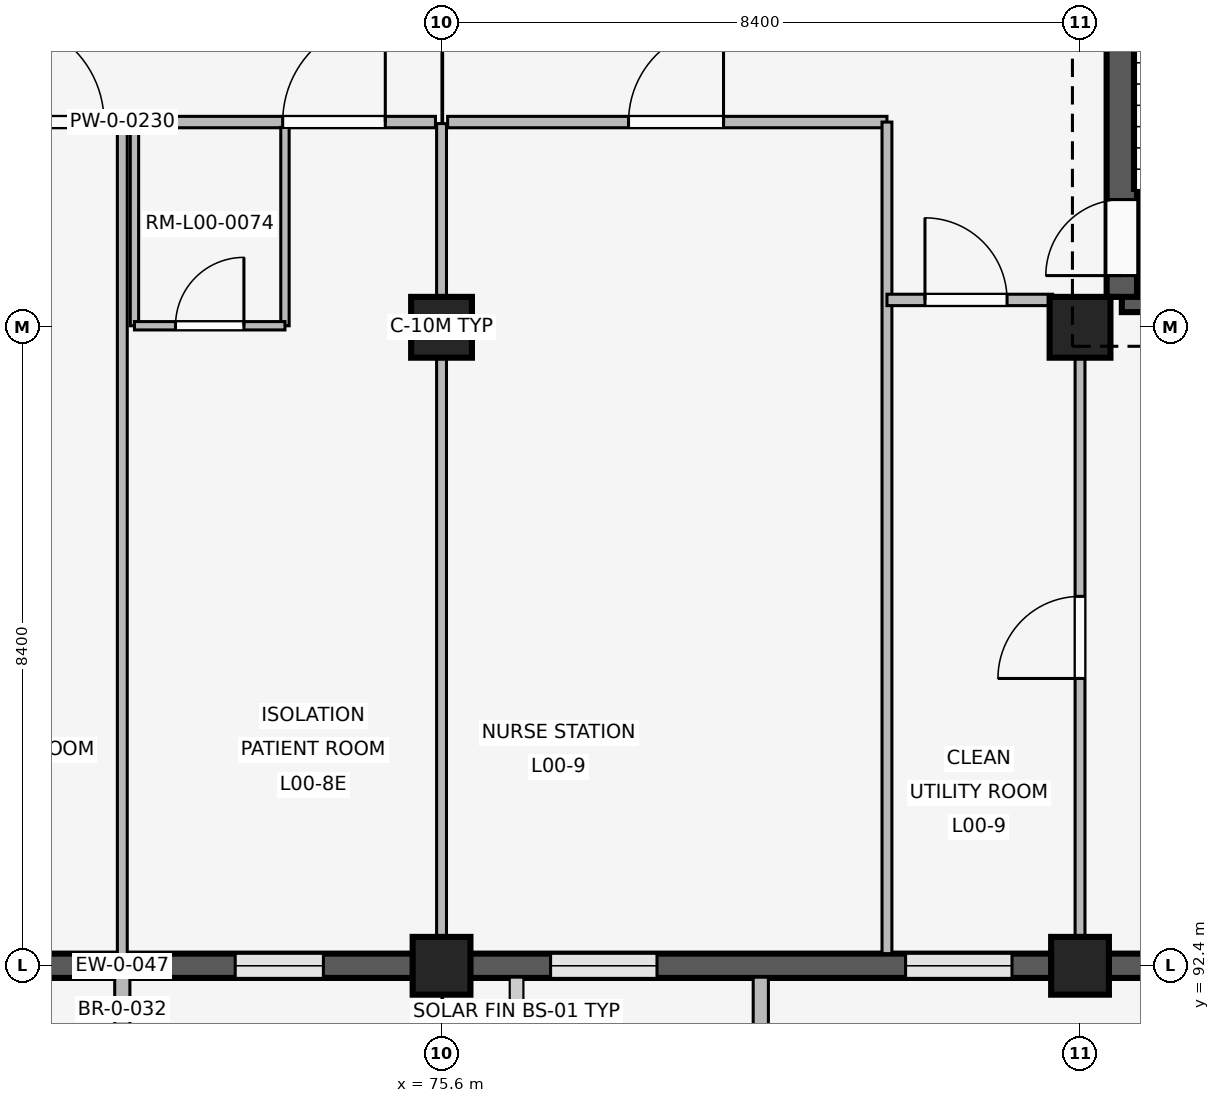
"""IFC4 building model, lengths in metres.
Left out: names, types, materials, properties, quantities, classifications, styles, units other than length and angle.
Written with IfcOpenShell. Run it as: python <this file> out.ifc"""

import sys

from ifc_helpers import new_model, si_unit, direction, frame, frame_2d, origin, origin_2d, place, context, subcontext, project, spatial, rectangle, extrude, element, fill, save


model = new_model("IFC4")
c1 = context("Model", 3, precision=1e-05, world=origin(), true_north=direction((0.0, 1.0)))
c2 = subcontext(c1, "Body", "Model", "MODEL_VIEW")
j1 = project(units=[si_unit("LENGTHUNIT", "METRE"), si_unit("PLANEANGLEUNIT", "RADIAN")], contexts=[c1])
p1 = place(None, origin())
s1 = spatial("IfcSite", under=j1, at=p1, CompositionType="ELEMENT")
p2 = place(p1, origin())
s2 = spatial("IfcBuilding", under=s1, at=p2, CompositionType="ELEMENT")
p3 = place(p2, origin())
s3 = spatial("IfcBuildingStorey", under=s2, at=p3, CompositionType="ELEMENT", Elevation=0.0)
p4 = place(p3, frame((75.6, 92.4, 0.0), z_axis=(0.0, 0.0, 1.0), x_axis=(1.0, 0.0, 0.0)))
e1 = element("IfcColumn", 1, at=p4, inside=s3, PredefinedType="COLUMN", context=c2, shape_type="SweptSolid", body=[
    extrude(rectangle(XDim=0.76, YDim=0.76, at=origin_2d()), origin(), (0.0, 0.0, 1.0), 4.8),
])
p5 = place(p3, frame((75.6, 100.8, 0.0), z_axis=(0.0, 0.0, 1.0), x_axis=(1.0, 0.0, 0.0)))
e2 = element("IfcColumn", 2, at=p5, inside=s3, PredefinedType="COLUMN", context=c2, shape_type="SweptSolid", body=[
    extrude(rectangle(XDim=0.8, YDim=0.8, at=origin_2d()), origin(), (0.0, 0.0, 1.0), 4.8),
])
p6 = place(p3, frame((84.0, 92.4, 0.0), z_axis=(0.0, 0.0, 1.0), x_axis=(1.0, 0.0, 0.0)))
e3 = element("IfcColumn", 3, at=p6, inside=s3, PredefinedType="COLUMN", context=c2, shape_type="SweptSolid", body=[
    extrude(rectangle(XDim=0.76, YDim=0.76, at=origin_2d()), origin(), (0.0, 0.0, 1.0), 4.8),
])
p7 = place(p3, frame((84.0, 100.8, 0.0), z_axis=(0.0, 0.0, 1.0), x_axis=(1.0, 0.0, 0.0)))
e4 = element("IfcColumn", 4, at=p7, inside=s3, PredefinedType="COLUMN", context=c2, shape_type="SweptSolid", body=[
    extrude(rectangle(XDim=0.8, YDim=0.8, at=origin_2d()), origin(), (0.0, 0.0, 1.0), 4.8),
])
p8 = place(p3, frame((75.225, 92.4, 0.0), z_axis=(0.0, 0.0, 1.0), x_axis=(-1.0, 0.0, 0.0)))
e5 = element("IfcWall", 5, at=p8, inside=s3, PredefinedType="SOLIDWALL", context=c2, shape_type="SweptSolid", body=[
    extrude(rectangle(XDim=7.65, YDim=0.32, at=frame_2d((3.825, 0.0))), origin(), (0.0, 0.0, 1.0), 3.82),
])
p9 = place(p8, frame((1.179, 0.0, 0.85)))
e6 = element("IfcOpeningElement", 6, at=p9, cuts=e5, PredefinedType="OPENING", context=c2, shape_type="SweptSolid", body=[
    extrude(rectangle(XDim=1.16, YDim=1.48, at=frame_2d((0.58, 0.74))), frame((0.0, 0.17, 0.0), z_axis=(0.0, -1.0, 0.0), x_axis=(1.0, 0.0, 0.0)), (0.0, 0.0, 1.0), 0.34),
])
p10 = place(p8, frame((5.311, 0.0, 0.85)))
e7 = element("IfcOpeningElement", 7, at=p10, cuts=e5, PredefinedType="OPENING", context=c2, shape_type="SweptSolid", body=[
    extrude(rectangle(XDim=1.16, YDim=1.48, at=frame_2d((0.58, 0.74))), frame((0.0, 0.17, 0.0), z_axis=(0.0, -1.0, 0.0), x_axis=(1.0, 0.0, 0.0)), (0.0, 0.0, 1.0), 0.34),
])
p11 = place(p3, frame((71.4, 92.25, 0.0), z_axis=(0.0, 0.0, 1.0), x_axis=(0.0, -1.0, 0.0)))
e8 = element("IfcWall", 8, at=p11, inside=s3, PredefinedType="ELEMENTEDWALL", context=c2, shape_type="SweptSolid", body=[
    extrude(rectangle(XDim=0.85, YDim=0.2, at=frame_2d((0.425, 0.0))), origin(), (0.0, 0.0, 1.0), 3.8),
])
p12 = place(p3, frame((83.625, 92.4, 0.0), z_axis=(0.0, 0.0, 1.0), x_axis=(-1.0, 0.0, 0.0)))
e9 = element("IfcWall", 9, at=p12, inside=s3, PredefinedType="SOLIDWALL", context=c2, shape_type="SweptSolid", body=[
    extrude(rectangle(XDim=7.65, YDim=0.32, at=frame_2d((3.825, 0.0))), origin(), (0.0, 0.0, 1.0), 3.82),
])
p13 = place(p12, frame((0.52, 0.0, 0.85)))
e10 = element("IfcOpeningElement", 10, at=p13, cuts=e9, PredefinedType="OPENING", context=c2, shape_type="SweptSolid", body=[
    extrude(rectangle(XDim=1.4, YDim=1.4, at=frame_2d((0.7, 0.7))), frame((0.0, 0.17, 0.0), z_axis=(0.0, -1.0, 0.0), x_axis=(1.0, 0.0, 0.0)), (0.0, 0.0, 1.0), 0.34),
])
p14 = place(p12, frame((5.19, 0.0, 0.85)))
e11 = element("IfcOpeningElement", 11, at=p14, cuts=e9, PredefinedType="OPENING", context=c2, shape_type="SweptSolid", body=[
    extrude(rectangle(XDim=1.4, YDim=1.4, at=frame_2d((0.7, 0.7))), frame((0.0, 0.17, 0.0), z_axis=(0.0, -1.0, 0.0), x_axis=(1.0, 0.0, 0.0)), (0.0, 0.0, 1.0), 0.34),
])
p15 = place(p3, frame((79.8, 92.25, 0.0), z_axis=(0.0, 0.0, 1.0), x_axis=(0.0, -1.0, 0.0)))
e12 = element("IfcWall", 12, at=p15, inside=s3, PredefinedType="ELEMENTEDWALL", context=c2, shape_type="SweptSolid", body=[
    extrude(rectangle(XDim=0.85, YDim=0.2, at=frame_2d((0.425, 0.0))), origin(), (0.0, 0.0, 1.0), 3.8),
])
p16 = place(p3, frame((92.025, 92.4, 0.0), z_axis=(0.0, 0.0, 1.0), x_axis=(-1.0, 0.0, 0.0)))
e13 = element("IfcWall", 13, at=p16, inside=s3, PredefinedType="SOLIDWALL", context=c2, shape_type="SweptSolid", body=[
    extrude(rectangle(XDim=7.65, YDim=0.32, at=frame_2d((3.825, 0.0))), origin(), (0.0, 0.0, 1.0), 3.82),
])
p17 = place(p16, frame((1.01, 0.0, 0.85)))
e14 = element("IfcOpeningElement", 14, at=p17, cuts=e13, PredefinedType="OPENING", context=c2, shape_type="SweptSolid", body=[
    extrude(rectangle(XDim=1.5, YDim=1.55, at=frame_2d((0.75, 0.775))), frame((0.0, 0.17, 0.0), z_axis=(0.0, -1.0, 0.0), x_axis=(1.0, 0.0, 0.0)), (0.0, 0.0, 1.0), 0.34),
])
p18 = place(p16, frame((5.14, 0.0, 0.85)))
e15 = element("IfcOpeningElement", 15, at=p18, cuts=e13, PredefinedType="OPENING", context=c2, shape_type="SweptSolid", body=[
    extrude(rectangle(XDim=1.5, YDim=1.55, at=frame_2d((0.75, 0.775))), frame((0.0, 0.17, 0.0), z_axis=(0.0, -1.0, 0.0), x_axis=(1.0, 0.0, 0.0)), (0.0, 0.0, 1.0), 0.34),
])
p19 = place(p3, frame((84.55, 101.2, 0.0), z_axis=(0.0, 0.0, 1.0), x_axis=(1.0, 0.0, 0.0)))
e16 = element("IfcWall", 16, at=p19, inside=s3, PredefinedType="SHEAR", context=c2, shape_type="SweptSolid", body=[
    extrude(rectangle(XDim=7.5, YDim=0.4, at=frame_2d((3.75, 0.0))), origin(), (0.0, 0.0, 1.0), 4.52),
])
p20 = place(p19, frame((4.85, 0.0, 0.0)))
e17 = element("IfcOpeningElement", 17, at=p20, cuts=e16, PredefinedType="OPENING", context=c2, shape_type="SweptSolid", body=[
    extrude(rectangle(XDim=1.2, YDim=2.2, at=frame_2d((0.6, 1.1))), frame((0.0, 0.21, 0.0), z_axis=(0.0, -1.0, 0.0), x_axis=(1.0, 0.0, 0.0)), (0.0, 0.0, 1.0), 0.42),
])
p21 = place(p3, frame((84.55, 101.2, 0.0), z_axis=(0.0, 0.0, 1.0), x_axis=(0.0, 1.0, 0.0)))
e18 = element("IfcWall", 18, at=p21, inside=s3, PredefinedType="SHEAR", context=c2, shape_type="SweptSolid", body=[
    extrude(rectangle(XDim=7.55, YDim=0.4, at=frame_2d((3.775, 0.0))), origin(), (0.0, 0.0, 1.0), 4.52),
])
p22 = place(p21, frame((0.28, 0.0, 0.0)))
e19 = element("IfcOpeningElement", 19, at=p22, cuts=e18, PredefinedType="OPENING", context=c2, shape_type="SweptSolid", body=[
    extrude(rectangle(XDim=1.0, YDim=2.15, at=frame_2d((0.5, 1.075))), frame((0.0, 0.21, 0.0), z_axis=(0.0, -1.0, 0.0), x_axis=(1.0, 0.0, 0.0)), (0.0, 0.0, 1.0), 0.42),
])
p23 = place(p3, frame((67.28, 103.5, 0.0), z_axis=(0.0, 0.0, 1.0), x_axis=(1.0, 0.0, 0.0)))
e20 = element("IfcWall", 20, at=p23, inside=s3, PredefinedType="PARTITIONING", context=c2, shape_type="SweptSolid", body=[
    extrude(rectangle(XDim=8.24, YDim=0.15, at=frame_2d((4.12, 0.0))), origin(), (0.0, 0.0, 1.0), 3.8),
])
p24 = place(p23, frame((2.53, 0.0, 0.0)))
e21 = element("IfcOpeningElement", 21, at=p24, cuts=e20, PredefinedType="OPENING", context=c2, shape_type="SweptSolid", body=[
    extrude(rectangle(XDim=1.35, YDim=2.25, at=frame_2d((0.675, 1.125))), frame((0.0, 0.085, 0.0), z_axis=(0.0, -1.0, 0.0), x_axis=(1.0, 0.0, 0.0)), (0.0, 0.0, 1.0), 0.17),
])
p25 = place(p23, frame((6.23, 0.0, 0.0)))
e22 = element("IfcOpeningElement", 22, at=p25, cuts=e20, PredefinedType="OPENING", context=c2, shape_type="SweptSolid", body=[
    extrude(rectangle(XDim=1.35, YDim=2.25, at=frame_2d((0.675, 1.125))), frame((0.0, 0.085, 0.0), z_axis=(0.0, -1.0, 0.0), x_axis=(1.0, 0.0, 0.0)), (0.0, 0.0, 1.0), 0.17),
])
p26 = place(p3, frame((71.4, 92.5, 0.0), z_axis=(0.0, 0.0, 1.0), x_axis=(0.0, 1.0, 0.0)))
e23 = element("IfcWall", 23, at=p26, inside=s3, PredefinedType="PARTITIONING", context=c2, shape_type="SweptSolid", body=[
    extrude(rectangle(XDim=10.93, YDim=0.13, at=frame_2d((5.465, 0.0))), origin(), (0.0, 0.0, 1.0), 3.8),
])
for number, where, z_axis, x_axis in (
    (24, (71.56, 100.82, 0.0), (0.0, 0.0, 1.0), (0.0, 1.0, 0.0)),
    (25, (73.54, 100.82, 0.0), (0.0, 0.0, 1.0), (0.0, 1.0, 0.0)),
):
    element("IfcWall", number, at=place(p3, frame(where, z_axis=z_axis, x_axis=x_axis)), inside=s3, PredefinedType="PARTITIONING", context=c2, shape_type="SweptSolid", body=[
        extrude(rectangle(XDim=2.61, YDim=0.11, at=frame_2d((1.305, 0.0))), origin(), (0.0, 0.0, 1.0), 3.8),
    ])
p27 = place(p3, frame((71.56, 100.82, 0.0), z_axis=(0.0, 0.0, 1.0), x_axis=(1.0, 0.0, 0.0)))
e26 = element("IfcWall", 26, at=p27, inside=s3, PredefinedType="PARTITIONING", context=c2, shape_type="SweptSolid", body=[
    extrude(rectangle(XDim=1.98, YDim=0.11, at=frame_2d((0.99, 0.0))), origin(), (0.0, 0.0, 1.0), 3.8),
])
p28 = place(p27, frame((0.54, 0.0, 0.0)))
e27 = element("IfcOpeningElement", 27, at=p28, cuts=e26, PredefinedType="OPENING", context=c2, shape_type="SweptSolid", body=[
    extrude(rectangle(XDim=0.9, YDim=2.1, at=frame_2d((0.45, 1.05))), frame((0.0, 0.065, 0.0), z_axis=(0.0, -1.0, 0.0), x_axis=(1.0, 0.0, 0.0)), (0.0, 0.0, 1.0), 0.13),
])
p29 = place(p3, frame((75.6, 92.54, 0.0), z_axis=(0.0, 0.0, 1.0), x_axis=(0.0, 1.0, 0.0)))
e28 = element("IfcWall", 28, at=p29, inside=s3, PredefinedType="PARTITIONING", context=c2, shape_type="SweptSolid", body=[
    extrude(rectangle(XDim=10.94, YDim=0.13, at=frame_2d((5.47, 0.0))), origin(), (0.0, 0.0, 1.0), 3.8),
])
p30 = place(p3, frame((75.68, 103.5, 0.0), z_axis=(0.0, 0.0, 1.0), x_axis=(1.0, 0.0, 0.0)))
e29 = element("IfcWall", 29, at=p30, inside=s3, PredefinedType="PARTITIONING", context=c2, shape_type="SweptSolid", body=[
    extrude(rectangle(XDim=5.78, YDim=0.15, at=frame_2d((2.89, 0.0))), origin(), (0.0, 0.0, 1.0), 3.8),
])
p31 = place(p30, frame((2.38, 0.0, 0.0)))
e30 = element("IfcOpeningElement", 30, at=p31, cuts=e29, PredefinedType="OPENING", context=c2, shape_type="SweptSolid", body=[
    extrude(rectangle(XDim=1.25, YDim=2.2, at=frame_2d((0.625, 1.1))), frame((0.0, 0.085, 0.0), z_axis=(0.0, -1.0, 0.0), x_axis=(1.0, 0.0, 0.0)), (0.0, 0.0, 1.0), 0.17),
])
p32 = place(p3, frame((81.46, 92.56, 0.0), z_axis=(0.0, 0.0, 1.0), x_axis=(0.0, 1.0, 0.0)))
e31 = element("IfcWall", 31, at=p32, inside=s3, PredefinedType="PARTITIONING", context=c2, shape_type="SweptSolid", body=[
    extrude(rectangle(XDim=10.94, YDim=0.13, at=frame_2d((5.47, 0.0))), origin(), (0.0, 0.0, 1.0), 3.8),
])
p33 = place(p3, frame((81.46, 101.16, 0.0), z_axis=(0.0, 0.0, 1.0), x_axis=(1.0, 0.0, 0.0)))
e32 = element("IfcWall", 32, at=p33, inside=s3, PredefinedType="PARTITIONING", context=c2, shape_type="SweptSolid", body=[
    extrude(rectangle(XDim=2.18, YDim=0.15, at=frame_2d((1.09, 0.0))), origin(), (0.0, 0.0, 1.0), 3.8),
])
p34 = place(p33, frame((0.5, 0.0, 0.0)))
e33 = element("IfcOpeningElement", 33, at=p34, cuts=e32, PredefinedType="OPENING", context=c2, shape_type="SweptSolid", body=[
    extrude(rectangle(XDim=1.08, YDim=2.15, at=frame_2d((0.54, 1.075))), frame((0.0, 0.085, 0.0), z_axis=(0.0, -1.0, 0.0), x_axis=(1.0, 0.0, 0.0)), (0.0, 0.0, 1.0), 0.17),
])
p35 = place(p3, frame((84.0, 92.54, 0.0), z_axis=(0.0, 0.0, 1.0), x_axis=(0.0, 1.0, 0.0)))
e34 = element("IfcWall", 34, at=p35, inside=s3, PredefinedType="PARTITIONING", context=c2, shape_type="SweptSolid", body=[
    extrude(rectangle(XDim=8.21, YDim=0.13, at=frame_2d((4.105, 0.0))), origin(), (0.0, 0.0, 1.0), 3.8),
])
p36 = place(p35, frame((3.64, 0.0, 0.0)))
e35 = element("IfcOpeningElement", 35, at=p36, cuts=e34, PredefinedType="OPENING", context=c2, shape_type="SweptSolid", body=[
    extrude(rectangle(XDim=1.08, YDim=2.15, at=frame_2d((0.54, 1.075))), frame((0.0, 0.075, 0.0), z_axis=(0.0, -1.0, 0.0), x_axis=(1.0, 0.0, 0.0)), (0.0, 0.0, 1.0), 0.15),
])
p37 = place(p9, origin())
e36 = element("IfcWindow", 36, at=p37, inside=s3, PartitioningType="SINGLE_PANEL", PredefinedType="WINDOW", context=c2, shape_type="SweptSolid", body=[
    extrude(rectangle(XDim=1.16, YDim=1.48, at=frame_2d((0.58, 0.74))), frame((0.0, 0.03, 0.0), z_axis=(0.0, -1.0, 0.0), x_axis=(1.0, 0.0, 0.0)), (0.0, 0.0, 1.0), 0.06),
])
fill(e6, e36)
p38 = place(p13, origin())
e37 = element("IfcWindow", 37, at=p38, inside=s3, PartitioningType="SINGLE_PANEL", PredefinedType="WINDOW", context=c2, shape_type="SweptSolid", body=[
    extrude(rectangle(XDim=1.4, YDim=1.4, at=frame_2d((0.7, 0.7))), frame((0.0, 0.03, 0.0), z_axis=(0.0, -1.0, 0.0), x_axis=(1.0, 0.0, 0.0)), (0.0, 0.0, 1.0), 0.06),
])
fill(e10, e37)
p39 = place(p14, origin())
e38 = element("IfcWindow", 38, at=p39, inside=s3, PartitioningType="SINGLE_PANEL", PredefinedType="WINDOW", context=c2, shape_type="SweptSolid", body=[
    extrude(rectangle(XDim=1.4, YDim=1.4, at=frame_2d((0.7, 0.7))), frame((0.0, 0.03, 0.0), z_axis=(0.0, -1.0, 0.0), x_axis=(1.0, 0.0, 0.0)), (0.0, 0.0, 1.0), 0.06),
])
fill(e11, e38)
p40 = place(p22, origin())
e39 = element("IfcDoor", 39, at=p40, inside=s3, OperationType="SINGLE_SWING_LEFT", PredefinedType="DOOR", context=c2, shape_type="SweptSolid", body=[
    extrude(rectangle(XDim=1.0, YDim=2.15, at=frame_2d((0.5, 1.075))), frame((0.0, 0.025, 0.0), z_axis=(0.0, -1.0, 0.0), x_axis=(1.0, 0.0, 0.0)), (0.0, 0.0, 1.0), 0.05),
])
fill(e19, e39)
p41 = place(p24, origin())
e40 = element("IfcDoor", 40, at=p41, inside=s3, OperationType="SINGLE_SWING_LEFT", PredefinedType="DOOR", context=c2, shape_type="SweptSolid", body=[
    extrude(rectangle(XDim=1.35, YDim=2.25, at=frame_2d((0.675, 1.125))), frame((0.0, 0.025, 0.0), z_axis=(0.0, -1.0, 0.0), x_axis=(1.0, 0.0, 0.0)), (0.0, 0.0, 1.0), 0.05),
])
fill(e21, e40)
p42 = place(p25, origin())
e41 = element("IfcDoor", 41, at=p42, inside=s3, OperationType="SINGLE_SWING_RIGHT", PredefinedType="DOOR", context=c2, shape_type="SweptSolid", body=[
    extrude(rectangle(XDim=1.35, YDim=2.25, at=frame_2d((0.675, 1.125))), frame((0.0, 0.025, 0.0), z_axis=(0.0, -1.0, 0.0), x_axis=(1.0, 0.0, 0.0)), (0.0, 0.0, 1.0), 0.05),
])
fill(e22, e41)
p43 = place(p28, origin())
e42 = element("IfcDoor", 42, at=p43, inside=s3, OperationType="SINGLE_SWING_RIGHT", PredefinedType="DOOR", context=c2, shape_type="SweptSolid", body=[
    extrude(rectangle(XDim=0.9, YDim=2.1, at=frame_2d((0.45, 1.05))), frame((0.0, 0.025, 0.0), z_axis=(0.0, -1.0, 0.0), x_axis=(1.0, 0.0, 0.0)), (0.0, 0.0, 1.0), 0.05),
])
fill(e27, e42)
p44 = place(p31, origin())
e43 = element("IfcDoor", 43, at=p44, inside=s3, OperationType="SINGLE_SWING_RIGHT", PredefinedType="DOOR", context=c2, shape_type="SweptSolid", body=[
    extrude(rectangle(XDim=1.25, YDim=2.2, at=frame_2d((0.625, 1.1))), frame((0.0, 0.025, 0.0), z_axis=(0.0, -1.0, 0.0), x_axis=(1.0, 0.0, 0.0)), (0.0, 0.0, 1.0), 0.05),
])
fill(e30, e43)
p45 = place(p34, origin())
e44 = element("IfcDoor", 44, at=p45, inside=s3, OperationType="SINGLE_SWING_LEFT", PredefinedType="DOOR", context=c2, shape_type="SweptSolid", body=[
    extrude(rectangle(XDim=1.08, YDim=2.15, at=frame_2d((0.54, 1.075))), frame((0.0, 0.025, 0.0), z_axis=(0.0, -1.0, 0.0), x_axis=(1.0, 0.0, 0.0)), (0.0, 0.0, 1.0), 0.05),
])
fill(e33, e44)
p46 = place(p36, origin())
e45 = element("IfcDoor", 45, at=p46, inside=s3, OperationType="SINGLE_SWING_LEFT", PredefinedType="DOOR", context=c2, shape_type="SweptSolid", body=[
    extrude(rectangle(XDim=1.08, YDim=2.15, at=frame_2d((0.54, 1.075))), frame((0.0, 0.025, 0.0), z_axis=(0.0, -1.0, 0.0), x_axis=(1.0, 0.0, 0.0)), (0.0, 0.0, 1.0), 0.05),
])
fill(e35, e45)
save(model, sys.argv[1])
